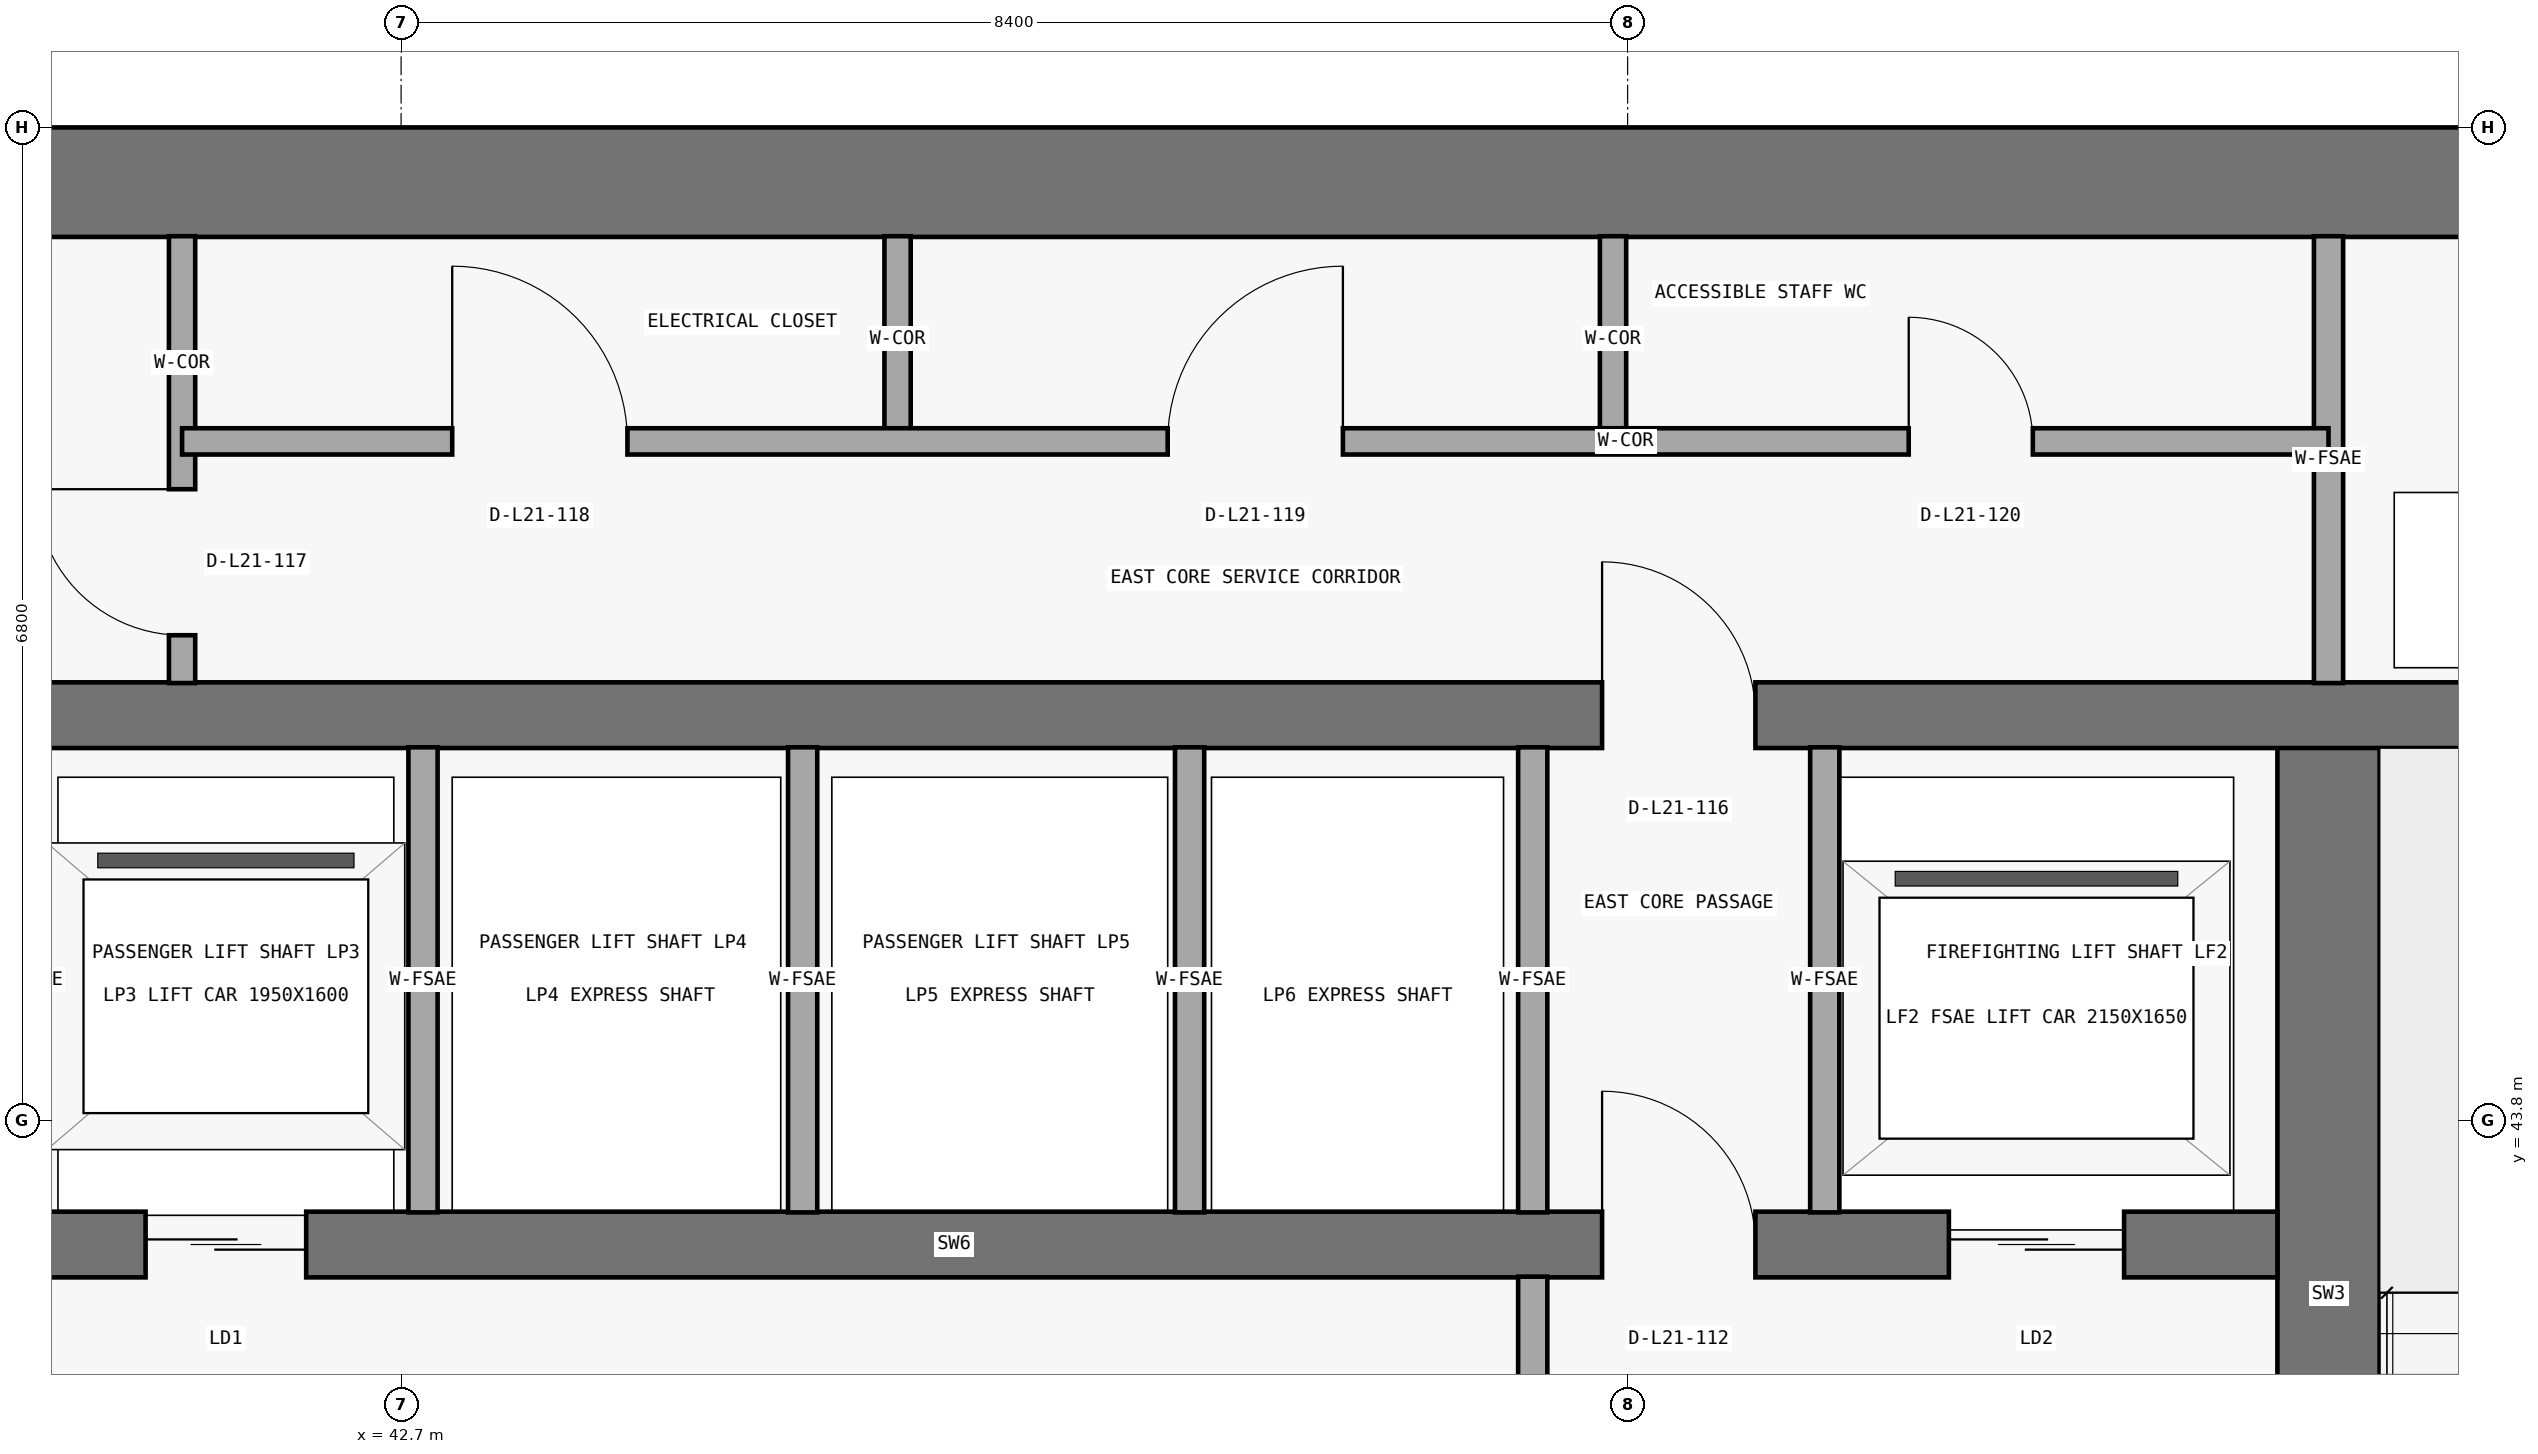
"""IFC4 building model, lengths in metres.
Left out: names, types, materials, properties, quantities, classifications, styles, units other than length and angle.
Written with IfcOpenShell. Run it as: python <this file> out.ifc"""

import sys

from ifc_helpers import new_model, si_unit, direction, frame, frame_2d, origin, place, context, subcontext, project, spatial, rectangle, extrude, element, fill, save


model = new_model("IFC4")
c1 = context("Model", 3, precision=1e-05, world=origin(), true_north=direction((0.0, 1.0)))
c2 = subcontext(c1, "Body", "Model", "MODEL_VIEW")
j1 = project(units=[si_unit("LENGTHUNIT", "METRE"), si_unit("PLANEANGLEUNIT", "RADIAN")], contexts=[c1])
p1 = place(None, origin())
s1 = spatial("IfcSite", under=j1, at=p1, CompositionType="ELEMENT")
p2 = place(p1, origin())
s2 = spatial("IfcBuilding", under=s1, at=p2, CompositionType="ELEMENT")
p3 = place(p2, frame((0.0, 0.0, 79.5)))
s3 = spatial("IfcBuildingStorey", under=s2, at=p3, CompositionType="ELEMENT", Elevation=79.5)
p4 = place(p3, frame((17.75, 50.225, 0.0), z_axis=(0.0, 0.0, 1.0), x_axis=(1.0, 0.0, 0.0)))
e1 = element("IfcWall", 1, at=p4, inside=s3, PredefinedType="SHEAR", context=c2, shape_type="SweptSolid", body=[
    extrude(rectangle(XDim=42.3, YDim=0.75, at=frame_2d((21.15, 0.0))), origin(), (0.0, 0.0, 1.0), 4.85),
])
p5 = place(p3, frame((55.9, 36.9, 0.0), z_axis=(0.0, 0.0, 1.0), x_axis=(0.0, 1.0, 0.0)))
e2 = element("IfcWall", 2, at=p5, inside=s3, PredefinedType="SHEAR", context=c2, shape_type="SweptSolid", body=[
    extrude(rectangle(XDim=9.675, YDim=0.7, at=frame_2d((4.837, 0.0))), origin(), (0.0, 0.0, 1.0), 4.85),
])
p6 = place(p5, frame((0.65, 0.0, 0.0)))
e3 = element("IfcOpeningElement", 3, at=p6, cuts=e2, PredefinedType="OPENING", context=c2, shape_type="SweptSolid", body=[
    extrude(rectangle(XDim=1.1, YDim=2.15, at=frame_2d((0.55, 1.075))), frame((0.0, 0.36, 0.0), z_axis=(0.0, -1.0, 0.0), x_axis=(1.0, 0.0, 0.0)), (0.0, 0.0, 1.0), 0.72),
])
p7 = place(p3, frame((22.25, 42.95, 0.0), z_axis=(0.0, 0.0, 1.0), x_axis=(1.0, 0.0, 0.0)))
e4 = element("IfcWall", 4, at=p7, inside=s3, PredefinedType="SHEAR", context=c2, shape_type="SweptSolid", body=[
    extrude(rectangle(XDim=33.3, YDim=0.45, at=frame_2d((16.65, 0.0))), origin(), (0.0, 0.0, 1.0), 4.85),
])
p8 = place(p7, frame((1.05, 0.0, 0.0)))
e5 = element("IfcOpeningElement", 5, at=p8, cuts=e4, PredefinedType="OPENING", context=c2, shape_type="SweptSolid", body=[
    extrude(rectangle(XDim=1.2, YDim=2.2, at=frame_2d((0.6, 1.1))), frame((0.0, 0.235, 0.0), z_axis=(0.0, -1.0, 0.0), x_axis=(1.0, 0.0, 0.0)), (0.0, 0.0, 1.0), 0.47),
])
p9 = place(p7, frame((31.05, 0.0, 0.0)))
e6 = element("IfcOpeningElement", 6, at=p9, cuts=e4, PredefinedType="OPENING", context=c2, shape_type="SweptSolid", body=[
    extrude(rectangle(XDim=1.2, YDim=2.2, at=frame_2d((0.6, 1.1))), frame((0.0, 0.235, 0.0), z_axis=(0.0, -1.0, 0.0), x_axis=(1.0, 0.0, 0.0)), (0.0, 0.0, 1.0), 0.47),
])
p10 = place(p7, frame((13.5, 0.0, 0.0)))
e7 = element("IfcOpeningElement", 7, at=p10, cuts=e4, PredefinedType="OPENING", context=c2, shape_type="SweptSolid", body=[
    extrude(rectangle(XDim=1.1, YDim=2.2, at=frame_2d((0.55, 1.1))), frame((0.0, 0.235, 0.0), z_axis=(0.0, -1.0, 0.0), x_axis=(1.0, 0.0, 0.0)), (0.0, 0.0, 1.0), 0.47),
])
p11 = place(p7, frame((16.1, 0.0, 0.0)))
e8 = element("IfcOpeningElement", 8, at=p11, cuts=e4, PredefinedType="OPENING", context=c2, shape_type="SweptSolid", body=[
    extrude(rectangle(XDim=1.1, YDim=2.2, at=frame_2d((0.55, 1.1))), frame((0.0, 0.235, 0.0), z_axis=(0.0, -1.0, 0.0), x_axis=(1.0, 0.0, 0.0)), (0.0, 0.0, 1.0), 0.47),
])
p12 = place(p7, frame((18.7, 0.0, 0.0)))
e9 = element("IfcOpeningElement", 9, at=p12, cuts=e4, PredefinedType="OPENING", context=c2, shape_type="SweptSolid", body=[
    extrude(rectangle(XDim=1.1, YDim=2.2, at=frame_2d((0.55, 1.1))), frame((0.0, 0.235, 0.0), z_axis=(0.0, -1.0, 0.0), x_axis=(1.0, 0.0, 0.0)), (0.0, 0.0, 1.0), 0.47),
])
p13 = place(p7, frame((3.625, 0.0, 0.0)))
e10 = element("IfcOpeningElement", 10, at=p13, cuts=e4, PredefinedType="OPENING", context=c2, shape_type="SweptSolid", body=[
    extrude(rectangle(XDim=1.05, YDim=2.15, at=frame_2d((0.525, 1.075))), frame((0.0, 0.235, 0.0), z_axis=(0.0, -1.0, 0.0), x_axis=(1.0, 0.0, 0.0)), (0.0, 0.0, 1.0), 0.47),
])
p14 = place(p7, frame((28.675, 0.0, 0.0)))
e11 = element("IfcOpeningElement", 11, at=p14, cuts=e4, PredefinedType="OPENING", context=c2, shape_type="SweptSolid", body=[
    extrude(rectangle(XDim=1.05, YDim=2.15, at=frame_2d((0.525, 1.075))), frame((0.0, 0.235, 0.0), z_axis=(0.0, -1.0, 0.0), x_axis=(1.0, 0.0, 0.0)), (0.0, 0.0, 1.0), 0.47),
])
p15 = place(p3, frame((18.2, 46.575, 0.0), z_axis=(0.0, 0.0, 1.0), x_axis=(1.0, 0.0, 0.0)))
e12 = element("IfcWall", 12, at=p15, inside=s3, PredefinedType="SHEAR", context=c2, shape_type="SweptSolid", body=[
    extrude(rectangle(XDim=41.4, YDim=0.45, at=frame_2d((20.7, 0.0))), origin(), (0.0, 0.0, 1.0), 4.85),
])
p16 = place(p15, frame((7.7, 0.0, 0.0)))
e13 = element("IfcOpeningElement", 13, at=p16, cuts=e12, PredefinedType="OPENING", context=c2, shape_type="SweptSolid", body=[
    extrude(rectangle(XDim=1.0, YDim=2.2, at=frame_2d((0.5, 1.1))), frame((0.0, 0.235, 0.0), z_axis=(0.0, -1.0, 0.0), x_axis=(1.0, 0.0, 0.0)), (0.0, 0.0, 1.0), 0.47),
])
p17 = place(p15, frame((32.725, 0.0, 0.0)))
e14 = element("IfcOpeningElement", 14, at=p17, cuts=e12, PredefinedType="OPENING", context=c2, shape_type="SweptSolid", body=[
    extrude(rectangle(XDim=1.05, YDim=2.15, at=frame_2d((0.525, 1.075))), frame((0.0, 0.235, 0.0), z_axis=(0.0, -1.0, 0.0), x_axis=(1.0, 0.0, 0.0)), (0.0, 0.0, 1.0), 0.47),
])
p18 = place(p3, frame((41.2, 46.795, 0.0), z_axis=(0.0, 0.0, 1.0), x_axis=(0.0, 1.0, 0.0)))
e15 = element("IfcWall", 15, at=p18, inside=s3, PredefinedType="PARTITIONING", context=c2, shape_type="SweptSolid", body=[
    extrude(rectangle(XDim=3.06, YDim=0.18, at=frame_2d((1.53, 0.0))), origin(), (0.0, 0.0, 1.0), 4.85),
])
p19 = place(p18, frame((0.327, 0.0, 0.0)))
e16 = element("IfcOpeningElement", 16, at=p19, cuts=e15, PredefinedType="OPENING", context=c2, shape_type="SweptSolid", body=[
    extrude(rectangle(XDim=1.0, YDim=2.2, at=frame_2d((0.5, 1.1))), frame((0.0, 0.1, 0.0), z_axis=(0.0, -1.0, 0.0), x_axis=(1.0, 0.0, 0.0)), (0.0, 0.0, 1.0), 0.2),
])
for number, where, z_axis, x_axis in (
    (17, (42.85, 43.17, 0.0), (0.0, 0.0, 1.0), (0.0, 1.0, 0.0)),
    (18, (45.45, 43.17, 0.0), (0.0, 0.0, 1.0), (0.0, 1.0, 0.0)),
):
    element("IfcWall", number, at=place(p3, frame(where, z_axis=z_axis, x_axis=x_axis)), inside=s3, PredefinedType="PARTITIONING", context=c2, shape_type="SweptSolid", body=[
        extrude(rectangle(XDim=3.185, YDim=0.2, at=frame_2d((1.593, 0.0))), origin(), (0.0, 0.0, 1.0), 4.85),
    ])
p20 = place(p3, frame((46.1, 48.45, 0.0), z_axis=(0.0, 0.0, 1.0), x_axis=(0.0, 1.0, 0.0)))
e19 = element("IfcWall", 19, at=p20, inside=s3, PredefinedType="PARTITIONING", context=c2, shape_type="SweptSolid", body=[
    extrude(rectangle(XDim=1.405, YDim=0.18, at=frame_2d((0.703, 0.0))), origin(), (0.0, 0.0, 1.0), 4.85),
])
p21 = place(p3, frame((48.1, 43.17, 0.0), z_axis=(0.0, 0.0, 1.0), x_axis=(0.0, 1.0, 0.0)))
e20 = element("IfcWall", 20, at=p21, inside=s3, PredefinedType="PARTITIONING", context=c2, shape_type="SweptSolid", body=[
    extrude(rectangle(XDim=3.185, YDim=0.2, at=frame_2d((1.593, 0.0))), origin(), (0.0, 0.0, 1.0), 4.85),
])
p22 = place(p3, frame((50.45, 37.345, 0.0), z_axis=(0.0, 0.0, 1.0), x_axis=(0.0, 1.0, 0.0)))
e21 = element("IfcWall", 21, at=p22, inside=s3, PredefinedType="PARTITIONING", context=c2, shape_type="SweptSolid", body=[
    extrude(rectangle(XDim=5.385, YDim=0.2, at=frame_2d((2.692, 0.0))), origin(), (0.0, 0.0, 1.0), 4.85),
])
p23 = place(p3, frame((50.45, 43.17, 0.0), z_axis=(0.0, 0.0, 1.0), x_axis=(0.0, 1.0, 0.0)))
e22 = element("IfcWall", 22, at=p23, inside=s3, PredefinedType="PARTITIONING", context=c2, shape_type="SweptSolid", body=[
    extrude(rectangle(XDim=3.185, YDim=0.2, at=frame_2d((1.593, 0.0))), origin(), (0.0, 0.0, 1.0), 4.85),
])
p24 = place(p3, frame((51.0, 48.45, 0.0), z_axis=(0.0, 0.0, 1.0), x_axis=(0.0, 1.0, 0.0)))
e23 = element("IfcWall", 23, at=p24, inside=s3, PredefinedType="PARTITIONING", context=c2, shape_type="SweptSolid", body=[
    extrude(rectangle(XDim=1.405, YDim=0.18, at=frame_2d((0.703, 0.0))), origin(), (0.0, 0.0, 1.0), 4.85),
])
p25 = place(p3, frame((52.45, 43.17, 0.0), z_axis=(0.0, 0.0, 1.0), x_axis=(0.0, 1.0, 0.0)))
e24 = element("IfcWall", 24, at=p25, inside=s3, PredefinedType="PARTITIONING", context=c2, shape_type="SweptSolid", body=[
    extrude(rectangle(XDim=3.185, YDim=0.2, at=frame_2d((1.593, 0.0))), origin(), (0.0, 0.0, 1.0), 4.85),
])
p26 = place(p3, frame((55.9, 46.795, 0.0), z_axis=(0.0, 0.0, 1.0), x_axis=(0.0, 1.0, 0.0)))
e25 = element("IfcWall", 25, at=p26, inside=s3, PredefinedType="PARTITIONING", context=c2, shape_type="SweptSolid", body=[
    extrude(rectangle(XDim=3.06, YDim=0.2, at=frame_2d((1.53, 0.0))), origin(), (0.0, 0.0, 1.0), 4.85),
])
p27 = place(p3, frame((41.2, 48.45, 0.0), z_axis=(0.0, 0.0, 1.0), x_axis=(1.0, 0.0, 0.0)))
e26 = element("IfcWall", 26, at=p27, inside=s3, PredefinedType="PARTITIONING", context=c2, shape_type="SweptSolid", body=[
    extrude(rectangle(XDim=14.7, YDim=0.18, at=frame_2d((7.35, 0.0))), origin(), (0.0, 0.0, 1.0), 4.85),
])
p28 = place(p27, frame((1.85, 0.0, 0.0)))
e27 = element("IfcOpeningElement", 27, at=p28, cuts=e26, PredefinedType="OPENING", context=c2, shape_type="SweptSolid", body=[
    extrude(rectangle(XDim=1.2, YDim=2.2, at=frame_2d((0.6, 1.1))), frame((0.0, 0.1, 0.0), z_axis=(0.0, -1.0, 0.0), x_axis=(1.0, 0.0, 0.0)), (0.0, 0.0, 1.0), 0.2),
])
p29 = place(p27, frame((6.75, 0.0, 0.0)))
e28 = element("IfcOpeningElement", 28, at=p29, cuts=e26, PredefinedType="OPENING", context=c2, shape_type="SweptSolid", body=[
    extrude(rectangle(XDim=1.2, YDim=2.2, at=frame_2d((0.6, 1.1))), frame((0.0, 0.1, 0.0), z_axis=(0.0, -1.0, 0.0), x_axis=(1.0, 0.0, 0.0)), (0.0, 0.0, 1.0), 0.2),
])
p30 = place(p27, frame((11.825, 0.0, 0.0)))
e29 = element("IfcOpeningElement", 29, at=p30, cuts=e26, PredefinedType="OPENING", context=c2, shape_type="SweptSolid", body=[
    extrude(rectangle(XDim=0.85, YDim=2.1, at=frame_2d((0.425, 1.05))), frame((0.0, 0.1, 0.0), z_axis=(0.0, -1.0, 0.0), x_axis=(1.0, 0.0, 0.0)), (0.0, 0.0, 1.0), 0.2),
])
p31 = place(p9, origin())
e30 = element("IfcDoor", 30, at=p31, inside=s3, OperationType="DOUBLE_DOOR_SLIDING", PredefinedType="DOOR", context=c2, shape_type="SweptSolid", body=[
    extrude(rectangle(XDim=1.2, YDim=2.2, at=frame_2d((0.6, 1.1))), frame((0.0, 0.025, 0.0), z_axis=(0.0, -1.0, 0.0), x_axis=(1.0, 0.0, 0.0)), (0.0, 0.0, 1.0), 0.05),
])
fill(e6, e30)
p32 = place(p12, origin())
e31 = element("IfcDoor", 31, at=p32, inside=s3, OperationType="DOUBLE_DOOR_SLIDING", PredefinedType="DOOR", context=c2, shape_type="SweptSolid", body=[
    extrude(rectangle(XDim=1.1, YDim=2.2, at=frame_2d((0.55, 1.1))), frame((0.0, 0.025, 0.0), z_axis=(0.0, -1.0, 0.0), x_axis=(1.0, 0.0, 0.0)), (0.0, 0.0, 1.0), 0.05),
])
fill(e9, e31)
p33 = place(p14, origin())
e32 = element("IfcDoor", 32, at=p33, inside=s3, OperationType="SINGLE_SWING_LEFT", PredefinedType="DOOR", context=c2, shape_type="SweptSolid", body=[
    extrude(rectangle(XDim=1.05, YDim=2.15, at=frame_2d((0.525, 1.075))), frame((0.0, 0.025, 0.0), z_axis=(0.0, -1.0, 0.0), x_axis=(1.0, 0.0, 0.0)), (0.0, 0.0, 1.0), 0.05),
])
fill(e11, e32)
p34 = place(p17, origin())
e33 = element("IfcDoor", 33, at=p34, inside=s3, OperationType="SINGLE_SWING_LEFT", PredefinedType="DOOR", context=c2, shape_type="SweptSolid", body=[
    extrude(rectangle(XDim=1.05, YDim=2.15, at=frame_2d((0.525, 1.075))), frame((0.0, 0.025, 0.0), z_axis=(0.0, -1.0, 0.0), x_axis=(1.0, 0.0, 0.0)), (0.0, 0.0, 1.0), 0.05),
])
fill(e14, e33)
p35 = place(p19, origin())
e34 = element("IfcDoor", 34, at=p35, inside=s3, OperationType="SINGLE_SWING_RIGHT", PredefinedType="DOOR", context=c2, shape_type="SweptSolid", body=[
    extrude(rectangle(XDim=1.0, YDim=2.2, at=frame_2d((0.5, 1.1))), frame((0.0, 0.025, 0.0), z_axis=(0.0, -1.0, 0.0), x_axis=(1.0, 0.0, 0.0)), (0.0, 0.0, 1.0), 0.05),
])
fill(e16, e34)
p36 = place(p28, origin())
e35 = element("IfcDoor", 35, at=p36, inside=s3, OperationType="SINGLE_SWING_LEFT", PredefinedType="DOOR", context=c2, shape_type="SweptSolid", body=[
    extrude(rectangle(XDim=1.2, YDim=2.2, at=frame_2d((0.6, 1.1))), frame((0.0, 0.025, 0.0), z_axis=(0.0, -1.0, 0.0), x_axis=(1.0, 0.0, 0.0)), (0.0, 0.0, 1.0), 0.05),
])
fill(e27, e35)
p37 = place(p29, origin())
e36 = element("IfcDoor", 36, at=p37, inside=s3, OperationType="SINGLE_SWING_RIGHT", PredefinedType="DOOR", context=c2, shape_type="SweptSolid", body=[
    extrude(rectangle(XDim=1.2, YDim=2.2, at=frame_2d((0.6, 1.1))), frame((0.0, 0.025, 0.0), z_axis=(0.0, -1.0, 0.0), x_axis=(1.0, 0.0, 0.0)), (0.0, 0.0, 1.0), 0.05),
])
fill(e28, e36)
p38 = place(p30, origin())
e37 = element("IfcDoor", 37, at=p38, inside=s3, OperationType="SINGLE_SWING_LEFT", PredefinedType="DOOR", context=c2, shape_type="SweptSolid", body=[
    extrude(rectangle(XDim=0.85, YDim=2.1, at=frame_2d((0.425, 1.05))), frame((0.0, 0.025, 0.0), z_axis=(0.0, -1.0, 0.0), x_axis=(1.0, 0.0, 0.0)), (0.0, 0.0, 1.0), 0.05),
])
fill(e29, e37)
save(model, sys.argv[1])
